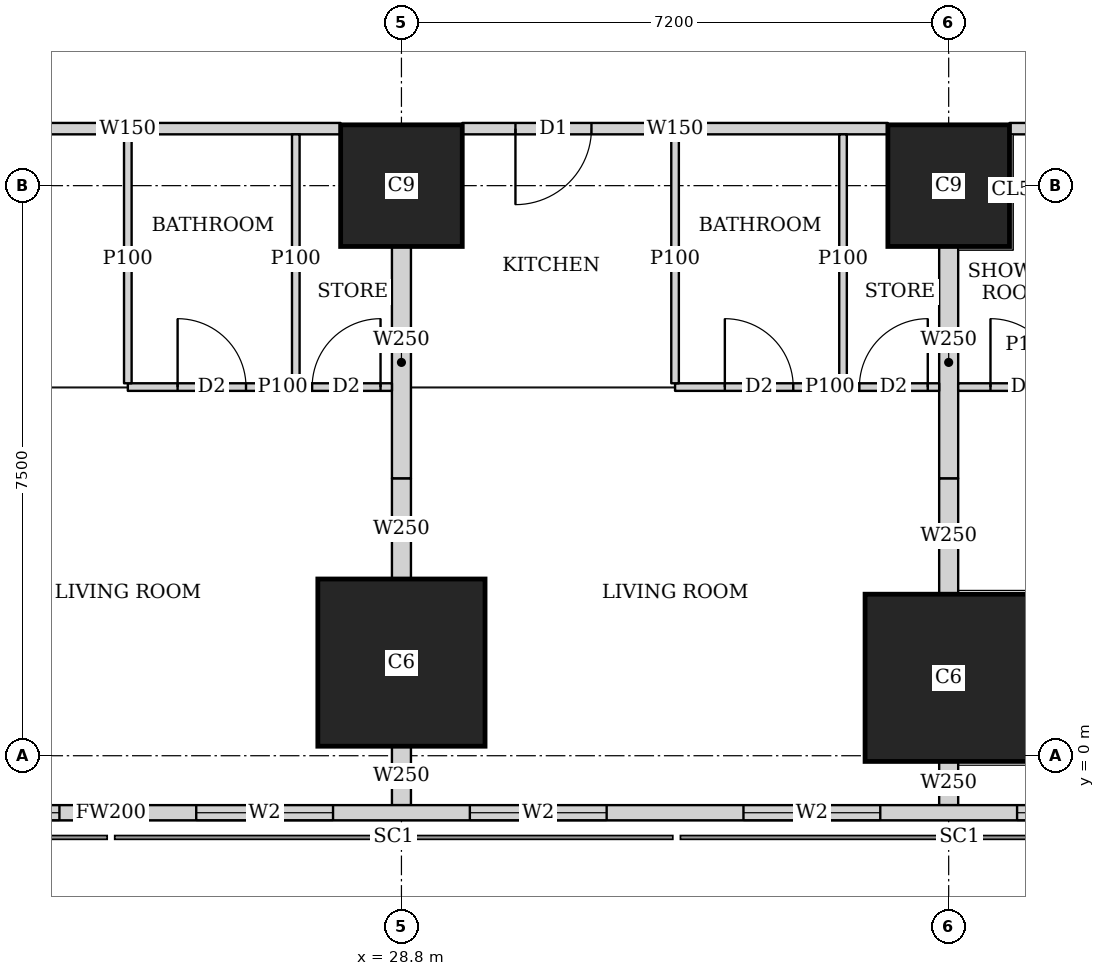
"""IFC4 building model, lengths in metres.
Left out: names, types, materials, properties, quantities, classifications, styles, units other than length and angle.
Written with IfcOpenShell. Run it as: python <this file> out.ifc"""

import sys

from ifc_helpers import new_model, si_unit, direction, frame, frame_2d, origin, origin_2d, place, context, subcontext, project, spatial, rectangle, extrude, element, fill, save


model = new_model("IFC4")
c1 = context("Model", 3, precision=1e-05, world=origin(), true_north=direction((0.0, 1.0)))
c2 = subcontext(c1, "Body", "Model", "MODEL_VIEW")
j1 = project(units=[si_unit("LENGTHUNIT", "METRE"), si_unit("PLANEANGLEUNIT", "RADIAN")], contexts=[c1])
p1 = place(None, origin())
s1 = spatial("IfcSite", under=j1, at=p1, CompositionType="ELEMENT")
p2 = place(p1, origin())
s2 = spatial("IfcBuilding", under=s1, at=p2, CompositionType="ELEMENT")
p3 = place(p2, frame((0.0, 0.0, 122.9)))
s3 = spatial("IfcBuildingStorey", under=s2, at=p3, CompositionType="ELEMENT", Elevation=122.9)
for number, where, z_axis, x_axis in (
    (1, (28.8, 1.225, 0.0), (0.0, 0.0, 1.0), (1.0, 0.0, 0.0)),
    (2, (36.0, 1.025, 0.0), (0.0, 0.0, 1.0), (1.0, 0.0, 0.0)),
):
    element("IfcColumn", number, at=place(p3, frame(where, z_axis=z_axis, x_axis=x_axis)), inside=s3, PredefinedType="COLUMN", context=c2, shape_type="SweptSolid", body=[
        extrude(rectangle(XDim=2.2, YDim=2.2, at=origin_2d()), origin(), (0.0, 0.0, 1.0), 3.75),
    ])
for number, where, z_axis, x_axis in (
    (3, (28.8, 7.5, 0.0), (0.0, 0.0, 1.0), (1.0, 0.0, 0.0)),
    (4, (36.0, 7.5, 0.0), (0.0, 0.0, 1.0), (1.0, 0.0, 0.0)),
):
    element("IfcColumn", number, at=place(p3, frame(where, z_axis=z_axis, x_axis=x_axis)), inside=s3, PredefinedType="COLUMN", context=c2, shape_type="SweptSolid", body=[
        extrude(rectangle(XDim=1.6, YDim=1.6, at=origin_2d()), origin(), (0.0, 0.0, 1.0), 3.75),
    ])
p4 = place(p3, frame((2.163, -0.75, 0.0), z_axis=(0.0, 0.0, 1.0), x_axis=(1.0, 0.0, 0.0)))
e5 = element("IfcWall", 5, at=p4, inside=s3, PredefinedType="SOLIDWALL", context=c2, shape_type="SweptSolid", body=[
    extrude(rectangle(XDim=45.628, YDim=0.2, at=frame_2d((22.814, 0.0))), origin(), (0.0, 0.0, 1.0), 3.5),
])
p5 = place(p4, frame((9.537, 0.0, 0.9)))
e6 = element("IfcOpeningElement", 6, at=p5, cuts=e5, PredefinedType="OPENING", context=c2, shape_type="SweptSolid", body=[
    extrude(rectangle(XDim=1.8, YDim=1.5, at=frame_2d((0.9, 0.75))), frame((0.0, 0.11, 0.0), z_axis=(0.0, -1.0, 0.0), x_axis=(1.0, 0.0, 0.0)), (0.0, 0.0, 1.0), 0.22),
])
p6 = place(p4, frame((13.137, 0.0, 0.9)))
e7 = element("IfcOpeningElement", 7, at=p6, cuts=e5, PredefinedType="OPENING", context=c2, shape_type="SweptSolid", body=[
    extrude(rectangle(XDim=1.8, YDim=1.5, at=frame_2d((0.9, 0.75))), frame((0.0, 0.11, 0.0), z_axis=(0.0, -1.0, 0.0), x_axis=(1.0, 0.0, 0.0)), (0.0, 0.0, 1.0), 0.22),
])
p7 = place(p4, frame((16.737, 0.0, 0.9)))
e8 = element("IfcOpeningElement", 8, at=p7, cuts=e5, PredefinedType="OPENING", context=c2, shape_type="SweptSolid", body=[
    extrude(rectangle(XDim=1.8, YDim=1.5, at=frame_2d((0.9, 0.75))), frame((0.0, 0.11, 0.0), z_axis=(0.0, -1.0, 0.0), x_axis=(1.0, 0.0, 0.0)), (0.0, 0.0, 1.0), 0.22),
])
p8 = place(p4, frame((20.337, 0.0, 0.9)))
e9 = element("IfcOpeningElement", 9, at=p8, cuts=e5, PredefinedType="OPENING", context=c2, shape_type="SweptSolid", body=[
    extrude(rectangle(XDim=1.8, YDim=1.5, at=frame_2d((0.9, 0.75))), frame((0.0, 0.11, 0.0), z_axis=(0.0, -1.0, 0.0), x_axis=(1.0, 0.0, 0.0)), (0.0, 0.0, 1.0), 0.22),
])
p9 = place(p4, frame((23.937, 0.0, 0.9)))
e10 = element("IfcOpeningElement", 10, at=p9, cuts=e5, PredefinedType="OPENING", context=c2, shape_type="SweptSolid", body=[
    extrude(rectangle(XDim=1.8, YDim=1.5, at=frame_2d((0.9, 0.75))), frame((0.0, 0.11, 0.0), z_axis=(0.0, -1.0, 0.0), x_axis=(1.0, 0.0, 0.0)), (0.0, 0.0, 1.0), 0.22),
])
p10 = place(p4, frame((27.537, 0.0, 0.9)))
e11 = element("IfcOpeningElement", 11, at=p10, cuts=e5, PredefinedType="OPENING", context=c2, shape_type="SweptSolid", body=[
    extrude(rectangle(XDim=1.8, YDim=1.5, at=frame_2d((0.9, 0.75))), frame((0.0, 0.11, 0.0), z_axis=(0.0, -1.0, 0.0), x_axis=(1.0, 0.0, 0.0)), (0.0, 0.0, 1.0), 0.22),
])
p11 = place(p4, frame((31.137, 0.0, 0.9)))
e12 = element("IfcOpeningElement", 12, at=p11, cuts=e5, PredefinedType="OPENING", context=c2, shape_type="SweptSolid", body=[
    extrude(rectangle(XDim=1.8, YDim=1.5, at=frame_2d((0.9, 0.75))), frame((0.0, 0.11, 0.0), z_axis=(0.0, -1.0, 0.0), x_axis=(1.0, 0.0, 0.0)), (0.0, 0.0, 1.0), 0.22),
])
p12 = place(p4, frame((34.737, 0.0, 0.9)))
e13 = element("IfcOpeningElement", 13, at=p12, cuts=e5, PredefinedType="OPENING", context=c2, shape_type="SweptSolid", body=[
    extrude(rectangle(XDim=1.8, YDim=1.5, at=frame_2d((0.9, 0.75))), frame((0.0, 0.11, 0.0), z_axis=(0.0, -1.0, 0.0), x_axis=(1.0, 0.0, 0.0)), (0.0, 0.0, 1.0), 0.22),
])
p13 = place(p3, frame((40.356, 8.25, 0.0), z_axis=(0.0, 0.0, 1.0), x_axis=(-1.0, 0.0, 0.0)))
e14 = element("IfcWall", 14, at=p13, inside=s3, PredefinedType="SOLIDWALL", context=c2, shape_type="SweptSolid", body=[
    extrude(rectangle(XDim=3.555, YDim=0.15, at=frame_2d((1.777, 0.0))), origin(), (0.0, 0.0, 1.0), 3.5),
])
p14 = place(p13, frame((0.15, 0.0, 0.0)))
e15 = element("IfcOpeningElement", 15, at=p14, cuts=e14, PredefinedType="OPENING", context=c2, shape_type="SweptSolid", body=[
    extrude(rectangle(XDim=1.0, YDim=2.1, at=frame_2d((0.5, 1.05))), frame((0.0, 0.085, 0.0), z_axis=(0.0, -1.0, 0.0), x_axis=(1.0, 0.0, 0.0)), (0.0, 0.0, 1.0), 0.17),
])
p15 = place(p3, frame((35.199, 8.25, 0.0), z_axis=(0.0, 0.0, 1.0), x_axis=(-1.0, 0.0, 0.0)))
e16 = element("IfcWall", 16, at=p15, inside=s3, PredefinedType="SOLIDWALL", context=c2, shape_type="SweptSolid", body=[
    extrude(rectangle(XDim=5.598, YDim=0.15, at=frame_2d((2.799, 0.0))), origin(), (0.0, 0.0, 1.0), 3.5),
])
p16 = place(p15, frame((3.899, 0.0, 0.0)))
e17 = element("IfcOpeningElement", 17, at=p16, cuts=e16, PredefinedType="OPENING", context=c2, shape_type="SweptSolid", body=[
    extrude(rectangle(XDim=1.0, YDim=2.1, at=frame_2d((0.5, 1.05))), frame((0.0, 0.085, 0.0), z_axis=(0.0, -1.0, 0.0), x_axis=(1.0, 0.0, 0.0)), (0.0, 0.0, 1.0), 0.17),
])
p17 = place(p3, frame((27.999, 8.25, 0.0), z_axis=(0.0, 0.0, 1.0), x_axis=(-1.0, 0.0, 0.0)))
e18 = element("IfcWall", 18, at=p17, inside=s3, PredefinedType="SOLIDWALL", context=c2, shape_type="SweptSolid", body=[
    extrude(rectangle(XDim=5.598, YDim=0.15, at=frame_2d((2.799, 0.0))), origin(), (0.0, 0.0, 1.0), 3.5),
])
p18 = place(p17, frame((3.899, 0.0, 0.0)))
e19 = element("IfcOpeningElement", 19, at=p18, cuts=e18, PredefinedType="OPENING", context=c2, shape_type="SweptSolid", body=[
    extrude(rectangle(XDim=1.0, YDim=2.1, at=frame_2d((0.5, 1.05))), frame((0.0, 0.085, 0.0), z_axis=(0.0, -1.0, 0.0), x_axis=(1.0, 0.0, 0.0)), (0.0, 0.0, 1.0), 0.17),
])
p19 = place(p3, frame((33.382, 45.65, 0.0), z_axis=(0.0, 0.0, 1.0), x_axis=(0.185593544777, -0.982626600565, 0.0)))
e20 = element("IfcWall", 20, at=p19, inside=s3, PredefinedType="SOLIDWALL", context=c2, shape_type="SweptSolid", body=[
    extrude(rectangle(XDim=47.118, YDim=0.15, at=frame_2d((23.559, 0.0))), origin(), (0.0, 0.0, 1.0), 2.2),
])
p20 = place(p19, frame((10.662, 0.0, 0.0)))
e21 = element("IfcOpeningElement", 21, at=p20, cuts=e20, PredefinedType="OPENING", context=c2, shape_type="SweptSolid", body=[
    extrude(rectangle(XDim=1.0, YDim=2.1, at=frame_2d((0.5, 1.05))), frame((0.0, 0.085, 0.0), z_axis=(0.0, -1.0, 0.0), x_axis=(1.0, 0.0, 0.0)), (0.0, 0.0, 1.0), 0.17),
])
p21 = place(p19, frame((15.237, 0.0, 0.0)))
e22 = element("IfcOpeningElement", 22, at=p21, cuts=e20, PredefinedType="OPENING", context=c2, shape_type="SweptSolid", body=[
    extrude(rectangle(XDim=1.0, YDim=2.1, at=frame_2d((0.5, 1.05))), frame((0.0, 0.085, 0.0), z_axis=(0.0, -1.0, 0.0), x_axis=(1.0, 0.0, 0.0)), (0.0, 0.0, 1.0), 0.17),
])
p22 = place(p19, frame((22.87, 0.0, 0.0)))
e23 = element("IfcOpeningElement", 23, at=p22, cuts=e20, PredefinedType="OPENING", context=c2, shape_type="SweptSolid", body=[
    extrude(rectangle(XDim=1.0, YDim=2.1, at=frame_2d((0.5, 1.05))), frame((0.0, 0.085, 0.0), z_axis=(0.0, -1.0, 0.0), x_axis=(1.0, 0.0, 0.0)), (0.0, 0.0, 1.0), 0.17),
])
p23 = place(p19, frame((33.833, 0.0, 0.0)))
e24 = element("IfcOpeningElement", 24, at=p23, cuts=e20, PredefinedType="OPENING", context=c2, shape_type="SweptSolid", body=[
    extrude(rectangle(XDim=1.0, YDim=2.1, at=frame_2d((0.5, 1.05))), frame((0.0, 0.085, 0.0), z_axis=(0.0, -1.0, 0.0), x_axis=(1.0, 0.0, 0.0)), (0.0, 0.0, 1.0), 0.17),
])
p24 = place(p3, frame((28.675, 4.85, 0.0), z_axis=(0.0, 0.0, 1.0), x_axis=(-1.0, 0.0, 0.0)))
e25 = element("IfcWall", 25, at=p24, inside=s3, PredefinedType="PARTITIONING", context=c2, shape_type="SweptSolid", body=[
    extrude(rectangle(XDim=3.475, YDim=0.1, at=frame_2d((1.738, 0.0))), origin(), (0.0, 0.0, 1.0), 3.5),
])
p25 = place(p24, frame((1.92, 0.0, 0.0)))
e26 = element("IfcOpeningElement", 26, at=p25, cuts=e25, PredefinedType="OPENING", context=c2, shape_type="SweptSolid", body=[
    extrude(rectangle(XDim=0.9, YDim=2.1, at=frame_2d((0.45, 1.05))), frame((0.0, 0.06, 0.0), z_axis=(0.0, -1.0, 0.0), x_axis=(1.0, 0.0, 0.0)), (0.0, 0.0, 1.0), 0.12),
])
p26 = place(p24, frame((0.15, 0.0, 0.0)))
e27 = element("IfcOpeningElement", 27, at=p26, cuts=e25, PredefinedType="OPENING", context=c2, shape_type="SweptSolid", body=[
    extrude(rectangle(XDim=0.9, YDim=2.1, at=frame_2d((0.45, 1.05))), frame((0.0, 0.06, 0.0), z_axis=(0.0, -1.0, 0.0), x_axis=(1.0, 0.0, 0.0)), (0.0, 0.0, 1.0), 0.12),
])
for number, where, z_axis, x_axis in (
    (28, (25.2, 4.9, 0.0), (0.0, 0.0, 1.0), (0.0, 1.0, 0.0)),
    (29, (27.41, 4.9, 0.0), (0.0, 0.0, 1.0), (0.0, 1.0, 0.0)),
):
    element("IfcWall", number, at=place(p3, frame(where, z_axis=z_axis, x_axis=x_axis)), inside=s3, PredefinedType="PARTITIONING", context=c2, shape_type="SweptSolid", body=[
        extrude(rectangle(XDim=3.275, YDim=0.1, at=frame_2d((1.638, 0.0))), origin(), (0.0, 0.0, 1.0), 3.5),
    ])
p27 = place(p3, frame((35.875, 4.85, 0.0), z_axis=(0.0, 0.0, 1.0), x_axis=(-1.0, 0.0, 0.0)))
e30 = element("IfcWall", 30, at=p27, inside=s3, PredefinedType="PARTITIONING", context=c2, shape_type="SweptSolid", body=[
    extrude(rectangle(XDim=3.475, YDim=0.1, at=frame_2d((1.738, 0.0))), origin(), (0.0, 0.0, 1.0), 3.5),
])
p28 = place(p27, frame((1.92, 0.0, 0.0)))
e31 = element("IfcOpeningElement", 31, at=p28, cuts=e30, PredefinedType="OPENING", context=c2, shape_type="SweptSolid", body=[
    extrude(rectangle(XDim=0.9, YDim=2.1, at=frame_2d((0.45, 1.05))), frame((0.0, 0.06, 0.0), z_axis=(0.0, -1.0, 0.0), x_axis=(1.0, 0.0, 0.0)), (0.0, 0.0, 1.0), 0.12),
])
p29 = place(p27, frame((0.15, 0.0, 0.0)))
e32 = element("IfcOpeningElement", 32, at=p29, cuts=e30, PredefinedType="OPENING", context=c2, shape_type="SweptSolid", body=[
    extrude(rectangle(XDim=0.9, YDim=2.1, at=frame_2d((0.45, 1.05))), frame((0.0, 0.06, 0.0), z_axis=(0.0, -1.0, 0.0), x_axis=(1.0, 0.0, 0.0)), (0.0, 0.0, 1.0), 0.12),
])
for number, where, z_axis, x_axis in (
    (33, (32.4, 4.9, 0.0), (0.0, 0.0, 1.0), (0.0, 1.0, 0.0)),
    (34, (34.61, 4.9, 0.0), (0.0, 0.0, 1.0), (0.0, 1.0, 0.0)),
):
    element("IfcWall", number, at=place(p3, frame(where, z_axis=z_axis, x_axis=x_axis)), inside=s3, PredefinedType="PARTITIONING", context=c2, shape_type="SweptSolid", body=[
        extrude(rectangle(XDim=3.275, YDim=0.1, at=frame_2d((1.638, 0.0))), origin(), (0.0, 0.0, 1.0), 3.5),
    ])
p30 = place(p3, frame((28.8, -0.65, 0.0), z_axis=(0.0, 0.0, 1.0), x_axis=(0.0, 1.0, 0.0)))
e35 = element("IfcWall", 35, at=p30, inside=s3, PredefinedType="SOLIDWALL", context=c2, shape_type="SweptSolid", body=[
    extrude(rectangle(XDim=0.774, YDim=0.25, at=frame_2d((0.387, 0.0))), origin(), (0.0, 0.0, 1.0), 3.5),
])
p31 = place(p3, frame((28.8, 2.326, 0.0), z_axis=(0.0, 0.0, 1.0), x_axis=(0.0, 1.0, 0.0)))
e36 = element("IfcWall", 36, at=p31, inside=s3, PredefinedType="SOLIDWALL", context=c2, shape_type="SweptSolid", body=[
    extrude(rectangle(XDim=1.324, YDim=0.25, at=frame_2d((0.662, 0.0))), origin(), (0.0, 0.0, 1.0), 3.5),
])
p32 = place(p3, frame((28.8, 3.65, 0.0), z_axis=(0.0, 0.0, 1.0), x_axis=(0.0, 1.0, 0.0)))
e37 = element("IfcWall", 37, at=p32, inside=s3, PredefinedType="SOLIDWALL", context=c2, shape_type="SweptSolid", body=[
    extrude(rectangle(XDim=3.049, YDim=0.25, at=frame_2d((1.524, 0.0))), origin(), (0.0, 0.0, 1.0), 3.5),
])
p33 = place(p3, frame((38.029, 4.85, 0.0), z_axis=(0.0, 0.0, 1.0), x_axis=(-1.0, 0.0, 0.0)))
e38 = element("IfcWall", 38, at=p33, inside=s3, PredefinedType="PARTITIONING", context=c2, shape_type="SweptSolid", body=[
    extrude(rectangle(XDim=1.904, YDim=0.1, at=frame_2d((0.952, 0.0))), origin(), (0.0, 0.0, 1.0), 3.5),
])
p34 = place(p33, frame((0.579, 0.0, 0.0)))
e39 = element("IfcOpeningElement", 39, at=p34, cuts=e38, PredefinedType="OPENING", context=c2, shape_type="SweptSolid", body=[
    extrude(rectangle(XDim=0.9, YDim=2.1, at=frame_2d((0.45, 1.05))), frame((0.0, 0.06, 0.0), z_axis=(0.0, -1.0, 0.0), x_axis=(1.0, 0.0, 0.0)), (0.0, 0.0, 1.0), 0.12),
])
p35 = place(p3, frame((36.0, -0.65, 0.0), z_axis=(0.0, 0.0, 1.0), x_axis=(0.0, 1.0, 0.0)))
e40 = element("IfcWall", 40, at=p35, inside=s3, PredefinedType="SOLIDWALL", context=c2, shape_type="SweptSolid", body=[
    extrude(rectangle(XDim=0.574, YDim=0.25, at=frame_2d((0.287, 0.0))), origin(), (0.0, 0.0, 1.0), 3.5),
])
p36 = place(p3, frame((36.0, 2.126, 0.0), z_axis=(0.0, 0.0, 1.0), x_axis=(0.0, 1.0, 0.0)))
e41 = element("IfcWall", 41, at=p36, inside=s3, PredefinedType="SOLIDWALL", context=c2, shape_type="SweptSolid", body=[
    extrude(rectangle(XDim=1.524, YDim=0.25, at=frame_2d((0.762, 0.0))), origin(), (0.0, 0.0, 1.0), 3.5),
])
p37 = place(p3, frame((36.0, 3.65, 0.0), z_axis=(0.0, 0.0, 1.0), x_axis=(0.0, 1.0, 0.0)))
e42 = element("IfcWall", 42, at=p37, inside=s3, PredefinedType="SOLIDWALL", context=c2, shape_type="SweptSolid", body=[
    extrude(rectangle(XDim=3.049, YDim=0.25, at=frame_2d((1.524, 0.0))), origin(), (0.0, 0.0, 1.0), 3.5),
])
p38 = place(p8, origin())
e43 = element("IfcWindow", 43, at=p38, inside=s3, PartitioningType="SINGLE_PANEL", PredefinedType="WINDOW", context=c2, shape_type="SweptSolid", body=[
    extrude(rectangle(XDim=1.8, YDim=1.5, at=frame_2d((0.9, 0.75))), frame((0.0, 0.03, 0.0), z_axis=(0.0, -1.0, 0.0), x_axis=(1.0, 0.0, 0.0)), (0.0, 0.0, 1.0), 0.06),
])
fill(e9, e43)
p39 = place(p9, origin())
e44 = element("IfcWindow", 44, at=p39, inside=s3, PartitioningType="SINGLE_PANEL", PredefinedType="WINDOW", context=c2, shape_type="SweptSolid", body=[
    extrude(rectangle(XDim=1.8, YDim=1.5, at=frame_2d((0.9, 0.75))), frame((0.0, 0.03, 0.0), z_axis=(0.0, -1.0, 0.0), x_axis=(1.0, 0.0, 0.0)), (0.0, 0.0, 1.0), 0.06),
])
fill(e10, e44)
p40 = place(p10, origin())
e45 = element("IfcWindow", 45, at=p40, inside=s3, PartitioningType="SINGLE_PANEL", PredefinedType="WINDOW", context=c2, shape_type="SweptSolid", body=[
    extrude(rectangle(XDim=1.8, YDim=1.5, at=frame_2d((0.9, 0.75))), frame((0.0, 0.03, 0.0), z_axis=(0.0, -1.0, 0.0), x_axis=(1.0, 0.0, 0.0)), (0.0, 0.0, 1.0), 0.06),
])
fill(e11, e45)
p41 = place(p11, origin())
e46 = element("IfcWindow", 46, at=p41, inside=s3, PartitioningType="SINGLE_PANEL", PredefinedType="WINDOW", context=c2, shape_type="SweptSolid", body=[
    extrude(rectangle(XDim=1.8, YDim=1.5, at=frame_2d((0.9, 0.75))), frame((0.0, 0.03, 0.0), z_axis=(0.0, -1.0, 0.0), x_axis=(1.0, 0.0, 0.0)), (0.0, 0.0, 1.0), 0.06),
])
fill(e12, e46)
p42 = place(p12, origin())
e47 = element("IfcWindow", 47, at=p42, inside=s3, PartitioningType="SINGLE_PANEL", PredefinedType="WINDOW", context=c2, shape_type="SweptSolid", body=[
    extrude(rectangle(XDim=1.8, YDim=1.5, at=frame_2d((0.9, 0.75))), frame((0.0, 0.03, 0.0), z_axis=(0.0, -1.0, 0.0), x_axis=(1.0, 0.0, 0.0)), (0.0, 0.0, 1.0), 0.06),
])
fill(e13, e47)
p43 = place(p25, origin())
e48 = element("IfcDoor", 48, at=p43, inside=s3, OperationType="SINGLE_SWING_LEFT", PredefinedType="DOOR", context=c2, shape_type="SweptSolid", body=[
    extrude(rectangle(XDim=0.9, YDim=2.1, at=frame_2d((0.45, 1.05))), frame((0.0, 0.025, 0.0), z_axis=(0.0, -1.0, 0.0), x_axis=(1.0, 0.0, 0.0)), (0.0, 0.0, 1.0), 0.05),
])
fill(e26, e48)
p44 = place(p26, origin())
e49 = element("IfcDoor", 49, at=p44, inside=s3, OperationType="SINGLE_SWING_RIGHT", PredefinedType="DOOR", context=c2, shape_type="SweptSolid", body=[
    extrude(rectangle(XDim=0.9, YDim=2.1, at=frame_2d((0.45, 1.05))), frame((0.0, 0.025, 0.0), z_axis=(0.0, -1.0, 0.0), x_axis=(1.0, 0.0, 0.0)), (0.0, 0.0, 1.0), 0.05),
])
fill(e27, e49)
p45 = place(p28, origin())
e50 = element("IfcDoor", 50, at=p45, inside=s3, OperationType="SINGLE_SWING_LEFT", PredefinedType="DOOR", context=c2, shape_type="SweptSolid", body=[
    extrude(rectangle(XDim=0.9, YDim=2.1, at=frame_2d((0.45, 1.05))), frame((0.0, 0.025, 0.0), z_axis=(0.0, -1.0, 0.0), x_axis=(1.0, 0.0, 0.0)), (0.0, 0.0, 1.0), 0.05),
])
fill(e31, e50)
p46 = place(p29, origin())
e51 = element("IfcDoor", 51, at=p46, inside=s3, OperationType="SINGLE_SWING_RIGHT", PredefinedType="DOOR", context=c2, shape_type="SweptSolid", body=[
    extrude(rectangle(XDim=0.9, YDim=2.1, at=frame_2d((0.45, 1.05))), frame((0.0, 0.025, 0.0), z_axis=(0.0, -1.0, 0.0), x_axis=(1.0, 0.0, 0.0)), (0.0, 0.0, 1.0), 0.05),
])
fill(e32, e51)
p47 = place(p16, origin())
e52 = element("IfcDoor", 52, at=p47, inside=s3, OperationType="SINGLE_SWING_RIGHT", PredefinedType="DOOR", context=c2, shape_type="SweptSolid", body=[
    extrude(rectangle(XDim=1.0, YDim=2.1, at=frame_2d((0.5, 1.05))), frame((0.0, 0.025, 0.0), z_axis=(0.0, -1.0, 0.0), x_axis=(1.0, 0.0, 0.0)), (0.0, 0.0, 1.0), 0.05),
])
fill(e17, e52)
p48 = place(p34, origin())
e53 = element("IfcDoor", 53, at=p48, inside=s3, OperationType="SINGLE_SWING_LEFT", PredefinedType="DOOR", context=c2, shape_type="SweptSolid", body=[
    extrude(rectangle(XDim=0.9, YDim=2.1, at=frame_2d((0.45, 1.05))), frame((0.0, 0.025, 0.0), z_axis=(0.0, -1.0, 0.0), x_axis=(1.0, 0.0, 0.0)), (0.0, 0.0, 1.0), 0.05),
])
fill(e39, e53)
save(model, sys.argv[1])
